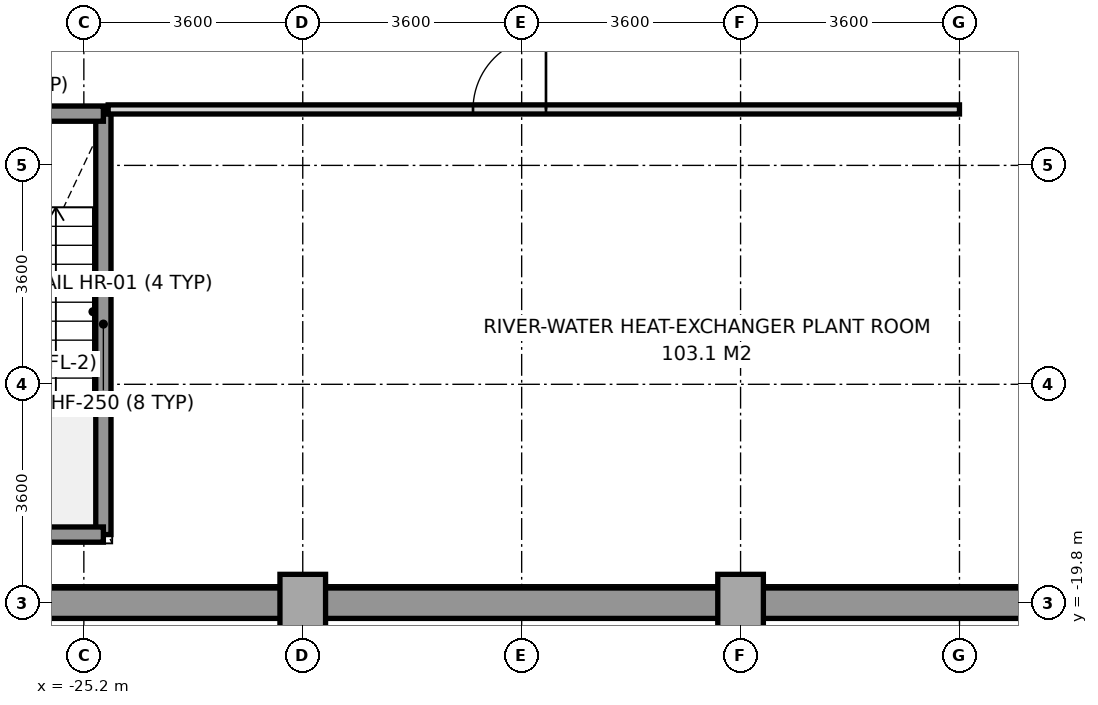
"""IFC4 building model, lengths in metres.
Left out: names, types, materials, properties, quantities, classifications, styles, units other than length and angle.
Written with IfcOpenShell. Run it as: python <this file> out.ifc"""

import sys

from ifc_helpers import new_model, si_unit, direction, frame, frame_2d, origin, origin_2d, place, context, subcontext, project, spatial, rectangle, extrude, source, transform, mapped, element, fill, save


model = new_model("IFC4")
c1 = context("Model", 3, precision=1e-05, world=origin(), true_north=direction((0.0, 1.0)))
c2 = subcontext(c1, "Body", "Model", "MODEL_VIEW")
j1 = project(units=[si_unit("LENGTHUNIT", "METRE"), si_unit("PLANEANGLEUNIT", "RADIAN")], contexts=[c1])
p1 = place(None, origin())
s1 = spatial("IfcSite", under=j1, at=p1, CompositionType="ELEMENT")
p2 = place(p1, origin())
s2 = spatial("IfcBuilding", under=s1, at=p2, CompositionType="ELEMENT")
p3 = place(p2, frame((0.0, 0.0, -8.4)))
s3 = spatial("IfcBuildingStorey", under=s2, at=p3, CompositionType="ELEMENT", Elevation=-8.4)
m1 = source(origin(), c2, "Body", "SweptSolid", [
    extrude(rectangle(XDim=0.75, YDim=0.95, at=origin_2d()), origin(), (0.0, 0.0, 1.0), 4.12),
])
for number, where, z_axis, x_axis in (
    (1, (-21.6, -19.8, -0.2), (0.0, 0.0, 1.0), (1.0, 0.0, 0.0)),
    (2, (-14.4, -19.8, -0.2), (0.0, 0.0, 1.0), (1.0, 0.0, 0.0)),
):
    element("IfcColumn", number, at=place(p3, frame(where, z_axis=z_axis, x_axis=x_axis)), inside=s3, PredefinedType="COLUMN", context=c2, shape_type="MappedRepresentation", body=[
        mapped(m1, transform((0.0, 0.0, 0.0), x_axis=(1.0, 0.0, 0.0), y_axis=(0.0, 1.0, 0.0), z_axis=(0.0, 0.0, 1.0), scale=1.0)),
    ])
p4 = place(p3, frame((-32.4, -19.8, -0.2), z_axis=(0.0, 0.0, 1.0), x_axis=(1.0, 0.0, 0.0)))
e3 = element("IfcWall", 3, at=p4, inside=s3, PredefinedType="USERDEFINED", context=c2, shape_type="SweptSolid", body=[
    extrude(rectangle(XDim=64.8, YDim=0.5, at=frame_2d((32.4, 0.0))), origin(), (0.0, 0.0, 1.0), 4.12),
])
p5 = place(p3, frame((-24.879, -18.671, -0.2), z_axis=(0.0, 0.0, 1.0), x_axis=(0.0, 1.0, 0.0)))
e4 = element("IfcWall", 4, at=p5, inside=s3, PredefinedType="SOLIDWALL", context=c2, shape_type="SweptSolid", body=[
    extrude(rectangle(XDim=6.922, YDim=0.25, at=frame_2d((3.461, 0.0))), origin(), (0.0, 0.0, 1.0), 4.12),
])
p6 = place(p3, frame((-28.001, -18.671, -0.2), z_axis=(0.0, 0.0, 1.0), x_axis=(1.0, 0.0, 0.0)))
e5 = element("IfcWall", 5, at=p6, inside=s3, PredefinedType="SOLIDWALL", context=c2, shape_type="SweptSolid", body=[
    extrude(rectangle(XDim=3.122, YDim=0.25, at=frame_2d((1.561, 0.0))), origin(), (0.0, 0.0, 1.0), 4.12),
])
p7 = place(p3, frame((-28.001, -11.749, -0.2), z_axis=(0.0, 0.0, 1.0), x_axis=(1.0, 0.0, 0.0)))
e6 = element("IfcWall", 6, at=p7, inside=s3, PredefinedType="SOLIDWALL", context=c2, shape_type="SweptSolid", body=[
    extrude(rectangle(XDim=3.122, YDim=0.25, at=frame_2d((1.561, 0.0))), origin(), (0.0, 0.0, 1.0), 4.12),
])
p8 = place(p7, frame((0.8, 0.0, 0.2)))
e7 = element("IfcOpeningElement", 7, at=p8, cuts=e6, PredefinedType="OPENING", context=c2, shape_type="SweptSolid", body=[
    extrude(rectangle(XDim=1.2, YDim=2.2, at=frame_2d((0.6, 1.1))), frame((0.0, 0.135, 0.0), z_axis=(0.0, -1.0, 0.0), x_axis=(1.0, 0.0, 0.0)), (0.0, 0.0, 1.0), 0.27),
])
p9 = place(p3, frame((-24.8, -11.68, 0.0), z_axis=(0.0, 0.0, 1.0), x_axis=(1.0, 0.0, 0.0)))
e8 = element("IfcWall", 8, at=p9, inside=s3, PredefinedType="PARTITIONING", context=c2, shape_type="SweptSolid", body=[
    extrude(rectangle(XDim=14.0, YDim=0.15, at=frame_2d((7.0, 0.0))), origin(), (0.0, 0.0, 1.0), 3.33),
])
p10 = place(p9, frame((6.0, 0.0, 0.0)))
e9 = element("IfcOpeningElement", 9, at=p10, cuts=e8, PredefinedType="OPENING", context=c2, shape_type="SweptSolid", body=[
    extrude(rectangle(XDim=1.2, YDim=2.2, at=frame_2d((0.6, 1.1))), frame((0.0, 0.085, 0.0), z_axis=(0.0, -1.0, 0.0), x_axis=(1.0, 0.0, 0.0)), (0.0, 0.0, 1.0), 0.17),
])
m2 = source(origin(), c2, "Body", "SweptSolid", [
    extrude(rectangle(XDim=1.2, YDim=2.2, at=frame_2d((0.6, 1.1))), frame((0.0, 0.025, 0.0), z_axis=(0.0, -1.0, 0.0), x_axis=(1.0, 0.0, 0.0)), (0.0, 0.0, 1.0), 0.05),
])
p11 = place(p10, origin())
e10 = element("IfcDoor", 10, at=p11, inside=s3, OperationType="SINGLE_SWING_RIGHT", PredefinedType="DOOR", context=c2, shape_type="MappedRepresentation", body=[
    mapped(m2, transform((0.0, 0.0, 0.0), x_axis=(1.0, 0.0, 0.0), y_axis=(0.0, 1.0, 0.0), z_axis=(0.0, 0.0, 1.0), scale=1.0)),
])
fill(e9, e10)
save(model, sys.argv[1])
